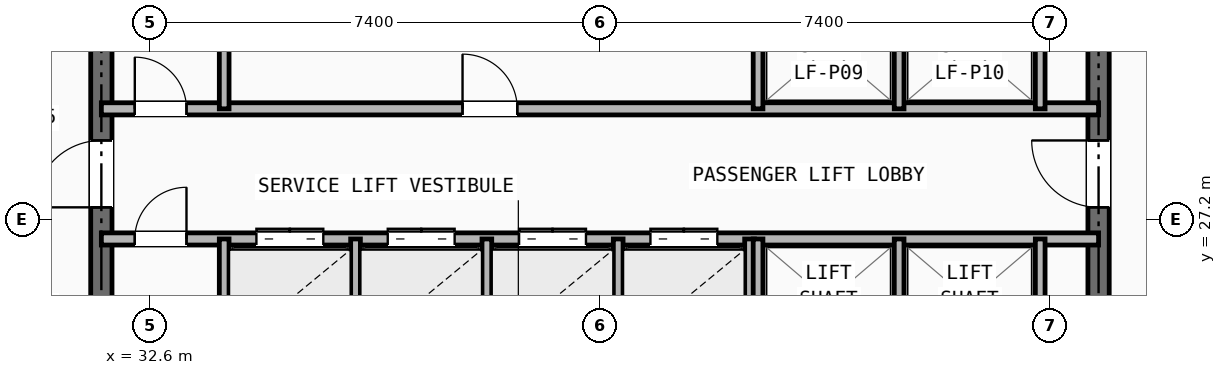
"""IFC4 building model, lengths in metres.
Left out: names, types, materials, properties, quantities, classifications, styles, units other than length and angle.
Written with IfcOpenShell. Run it as: python <this file> out.ifc"""

import sys

from ifc_helpers import new_model, si_unit, direction, frame, frame_2d, origin, place, context, subcontext, project, spatial, rectangle, extrude, element, fill, save


model = new_model("IFC4")
c1 = context("Model", 3, precision=1e-05, world=origin(), true_north=direction((0.0, 1.0)))
c2 = subcontext(c1, "Body", "Model", "MODEL_VIEW")
j1 = project(units=[si_unit("LENGTHUNIT", "METRE"), si_unit("PLANEANGLEUNIT", "RADIAN")], contexts=[c1])
p1 = place(None, origin())
s1 = spatial("IfcSite", under=j1, at=p1, CompositionType="ELEMENT")
p2 = place(p1, origin())
s2 = spatial("IfcBuilding", under=s1, at=p2, CompositionType="ELEMENT")
p3 = place(p2, frame((0.0, 0.0, 153.95)))
s3 = spatial("IfcBuildingStorey", under=s2, at=p3, CompositionType="ELEMENT", Elevation=153.95)
p4 = place(p3, frame((31.8, 16.4, 0.0), z_axis=(0.0, 0.0, 1.0), x_axis=(0.0, 1.0, 0.0)))
e1 = element("IfcWall", 1, at=p4, inside=s3, PredefinedType="SHEAR", context=c2, shape_type="SweptSolid", body=[
    extrude(rectangle(XDim=14.8, YDim=0.35, at=frame_2d((7.4, 0.0))), origin(), (0.0, 0.0, 1.0), 3.15),
])
p5 = place(p4, frame((11.0, 0.0, 0.0)))
e2 = element("IfcOpeningElement", 2, at=p5, cuts=e1, PredefinedType="OPENING", context=c2, shape_type="SweptSolid", body=[
    extrude(rectangle(XDim=1.1, YDim=2.15, at=frame_2d((0.55, 1.075))), frame((0.0, 0.185, 0.0), z_axis=(0.0, -1.0, 0.0), x_axis=(1.0, 0.0, 0.0)), (0.0, 0.0, 1.0), 0.37),
])
p6 = place(p3, frame((48.2, 16.4, 0.0), z_axis=(0.0, 0.0, 1.0), x_axis=(0.0, 1.0, 0.0)))
e3 = element("IfcWall", 3, at=p6, inside=s3, PredefinedType="SHEAR", context=c2, shape_type="SweptSolid", body=[
    extrude(rectangle(XDim=14.8, YDim=0.35, at=frame_2d((7.4, 0.0))), origin(), (0.0, 0.0, 1.0), 3.15),
])
p7 = place(p6, frame((11.0, 0.0, 0.0)))
e4 = element("IfcOpeningElement", 4, at=p7, cuts=e3, PredefinedType="OPENING", context=c2, shape_type="SweptSolid", body=[
    extrude(rectangle(XDim=1.1, YDim=2.15, at=frame_2d((0.55, 1.075))), frame((0.0, 0.185, 0.0), z_axis=(0.0, -1.0, 0.0), x_axis=(1.0, 0.0, 0.0)), (0.0, 0.0, 1.0), 0.37),
])
p8 = place(p3, frame((31.8, 29.02, 0.0), z_axis=(0.0, 0.0, 1.0), x_axis=(1.0, 0.0, 0.0)))
e5 = element("IfcWall", 5, at=p8, inside=s3, PredefinedType="SOLIDWALL", context=c2, shape_type="SweptSolid", body=[
    extrude(rectangle(XDim=16.4, YDim=0.2, at=frame_2d((8.2, 0.0))), origin(), (0.0, 0.0, 1.0), 2.601),
])
p9 = place(p8, frame((0.55, 0.0, 0.0)))
e6 = element("IfcOpeningElement", 6, at=p9, cuts=e5, PredefinedType="OPENING", context=c2, shape_type="SweptSolid", body=[
    extrude(rectangle(XDim=0.85, YDim=2.05, at=frame_2d((0.425, 1.025))), frame((0.0, 0.11, 0.0), z_axis=(0.0, -1.0, 0.0), x_axis=(1.0, 0.0, 0.0)), (0.0, 0.0, 1.0), 0.22),
])
p10 = place(p8, frame((5.94, 0.0, 0.0)))
e7 = element("IfcOpeningElement", 7, at=p10, cuts=e5, PredefinedType="OPENING", context=c2, shape_type="SweptSolid", body=[
    extrude(rectangle(XDim=0.9, YDim=2.1, at=frame_2d((0.45, 1.05))), frame((0.0, 0.11, 0.0), z_axis=(0.0, -1.0, 0.0), x_axis=(1.0, 0.0, 0.0)), (0.0, 0.0, 1.0), 0.22),
])
p11 = place(p3, frame((31.8, 26.88, 0.0), z_axis=(0.0, 0.0, 1.0), x_axis=(1.0, 0.0, 0.0)))
e8 = element("IfcWall", 8, at=p11, inside=s3, PredefinedType="SOLIDWALL", context=c2, shape_type="SweptSolid", body=[
    extrude(rectangle(XDim=16.4, YDim=0.2, at=frame_2d((8.2, 0.0))), origin(), (0.0, 0.0, 1.0), 2.601),
])
p12 = place(p11, frame((0.55, 0.0, 0.0)))
e9 = element("IfcOpeningElement", 9, at=p12, cuts=e8, PredefinedType="OPENING", context=c2, shape_type="SweptSolid", body=[
    extrude(rectangle(XDim=0.85, YDim=2.05, at=frame_2d((0.425, 1.025))), frame((0.0, 0.11, 0.0), z_axis=(0.0, -1.0, 0.0), x_axis=(1.0, 0.0, 0.0)), (0.0, 0.0, 1.0), 0.22),
])
p13 = place(p11, frame((2.55, 0.0, 0.0)))
e10 = element("IfcOpeningElement", 10, at=p13, cuts=e8, PredefinedType="OPENING", context=c2, shape_type="SweptSolid", body=[
    extrude(rectangle(XDim=1.1, YDim=2.15, at=frame_2d((0.55, 1.075))), frame((0.0, 0.11, 0.0), z_axis=(0.0, -1.0, 0.0), x_axis=(1.0, 0.0, 0.0)), (0.0, 0.0, 1.0), 0.22),
])
p14 = place(p11, frame((4.71, 0.0, 0.0)))
e11 = element("IfcOpeningElement", 11, at=p14, cuts=e8, PredefinedType="OPENING", context=c2, shape_type="SweptSolid", body=[
    extrude(rectangle(XDim=1.1, YDim=2.15, at=frame_2d((0.55, 1.075))), frame((0.0, 0.11, 0.0), z_axis=(0.0, -1.0, 0.0), x_axis=(1.0, 0.0, 0.0)), (0.0, 0.0, 1.0), 0.22),
])
p15 = place(p11, frame((6.87, 0.0, 0.0)))
e12 = element("IfcOpeningElement", 12, at=p15, cuts=e8, PredefinedType="OPENING", context=c2, shape_type="SweptSolid", body=[
    extrude(rectangle(XDim=1.1, YDim=2.15, at=frame_2d((0.55, 1.075))), frame((0.0, 0.11, 0.0), z_axis=(0.0, -1.0, 0.0), x_axis=(1.0, 0.0, 0.0)), (0.0, 0.0, 1.0), 0.22),
])
p16 = place(p11, frame((9.03, 0.0, 0.0)))
e13 = element("IfcOpeningElement", 13, at=p16, cuts=e8, PredefinedType="OPENING", context=c2, shape_type="SweptSolid", body=[
    extrude(rectangle(XDim=1.1, YDim=2.15, at=frame_2d((0.55, 1.075))), frame((0.0, 0.11, 0.0), z_axis=(0.0, -1.0, 0.0), x_axis=(1.0, 0.0, 0.0)), (0.0, 0.0, 1.0), 0.22),
])
p17 = place(p3, frame((33.82, 29.02, 0.0), z_axis=(0.0, 0.0, 1.0), x_axis=(0.0, 1.0, 0.0)))
e14 = element("IfcWall", 14, at=p17, inside=s3, PredefinedType="SOLIDWALL", context=c2, shape_type="SweptSolid", body=[
    extrude(rectangle(XDim=2.18, YDim=0.16, at=frame_2d((1.09, 0.0))), origin(), (0.0, 0.0, 1.0), 2.601),
])
for number, where, z_axis, x_axis in (
    (15, (33.82, 24.8, 0.0), (0.0, 0.0, 1.0), (0.0, 1.0, 0.0)),
    (16, (35.98, 24.8, 0.0), (0.0, 0.0, 1.0), (0.0, 1.0, 0.0)),
    (17, (38.14, 24.8, 0.0), (0.0, 0.0, 1.0), (0.0, 1.0, 0.0)),
    (18, (40.3, 24.8, 0.0), (0.0, 0.0, 1.0), (0.0, 1.0, 0.0)),
    (19, (42.46, 24.8, 0.0), (0.0, 0.0, 1.0), (0.0, 1.0, 0.0)),
):
    element("IfcWall", number, at=place(p3, frame(where, z_axis=z_axis, x_axis=x_axis)), inside=s3, PredefinedType="SOLIDWALL", context=c2, shape_type="SweptSolid", body=[
        extrude(rectangle(XDim=2.08, YDim=0.16, at=frame_2d((1.04, 0.0))), origin(), (0.0, 0.0, 1.0), 3.15),
    ])
for number, where, z_axis, x_axis in (
    (20, (42.6, 29.02, 0.0), (0.0, 0.0, 1.0), (0.0, 1.0, 0.0)),
    (21, (44.92, 29.02, 0.0), (0.0, 0.0, 1.0), (0.0, 1.0, 0.0)),
    (22, (47.24, 29.02, 0.0), (0.0, 0.0, 1.0), (0.0, 1.0, 0.0)),
):
    element("IfcWall", number, at=place(p3, frame(where, z_axis=z_axis, x_axis=x_axis)), inside=s3, PredefinedType="SOLIDWALL", context=c2, shape_type="SweptSolid", body=[
        extrude(rectangle(XDim=2.18, YDim=0.16, at=frame_2d((1.09, 0.0))), origin(), (0.0, 0.0, 1.0), 2.601),
    ])
for number, where, z_axis, x_axis in (
    (23, (42.6, 24.8, 0.0), (0.0, 0.0, 1.0), (0.0, 1.0, 0.0)),
    (24, (44.92, 24.8, 0.0), (0.0, 0.0, 1.0), (0.0, 1.0, 0.0)),
    (25, (47.24, 24.8, 0.0), (0.0, 0.0, 1.0), (0.0, 1.0, 0.0)),
):
    element("IfcWall", number, at=place(p3, frame(where, z_axis=z_axis, x_axis=x_axis)), inside=s3, PredefinedType="SOLIDWALL", context=c2, shape_type="SweptSolid", body=[
        extrude(rectangle(XDim=2.08, YDim=0.16, at=frame_2d((1.04, 0.0))), origin(), (0.0, 0.0, 1.0), 3.15),
    ])
p18 = place(p9, origin())
e26 = element("IfcDoor", 26, at=p18, inside=s3, OperationType="SINGLE_SWING_LEFT", PredefinedType="DOOR", context=c2, shape_type="SweptSolid", body=[
    extrude(rectangle(XDim=0.85, YDim=2.05, at=frame_2d((0.425, 1.025))), frame((0.0, 0.025, 0.0), z_axis=(0.0, -1.0, 0.0), x_axis=(1.0, 0.0, 0.0)), (0.0, 0.0, 1.0), 0.05),
])
fill(e6, e26)
p19 = place(p12, origin())
e27 = element("IfcDoor", 27, at=p19, inside=s3, OperationType="SINGLE_SWING_RIGHT", PredefinedType="DOOR", context=c2, shape_type="SweptSolid", body=[
    extrude(rectangle(XDim=0.85, YDim=2.05, at=frame_2d((0.425, 1.025))), frame((0.0, 0.025, 0.0), z_axis=(0.0, -1.0, 0.0), x_axis=(1.0, 0.0, 0.0)), (0.0, 0.0, 1.0), 0.05),
])
fill(e9, e27)
p20 = place(p5, origin())
e28 = element("IfcDoor", 28, at=p20, inside=s3, OperationType="SINGLE_SWING_LEFT", PredefinedType="DOOR", context=c2, shape_type="SweptSolid", body=[
    extrude(rectangle(XDim=1.1, YDim=2.15, at=frame_2d((0.55, 1.075))), frame((0.0, 0.025, 0.0), z_axis=(0.0, -1.0, 0.0), x_axis=(1.0, 0.0, 0.0)), (0.0, 0.0, 1.0), 0.05),
])
fill(e2, e28)
p21 = place(p7, origin())
e29 = element("IfcDoor", 29, at=p21, inside=s3, OperationType="SINGLE_SWING_RIGHT", PredefinedType="DOOR", context=c2, shape_type="SweptSolid", body=[
    extrude(rectangle(XDim=1.1, YDim=2.15, at=frame_2d((0.55, 1.075))), frame((0.0, 0.025, 0.0), z_axis=(0.0, -1.0, 0.0), x_axis=(1.0, 0.0, 0.0)), (0.0, 0.0, 1.0), 0.05),
])
fill(e4, e29)
p22 = place(p10, origin())
e30 = element("IfcDoor", 30, at=p22, inside=s3, OperationType="SINGLE_SWING_LEFT", PredefinedType="DOOR", context=c2, shape_type="SweptSolid", body=[
    extrude(rectangle(XDim=0.9, YDim=2.1, at=frame_2d((0.45, 1.05))), frame((0.0, 0.025, 0.0), z_axis=(0.0, -1.0, 0.0), x_axis=(1.0, 0.0, 0.0)), (0.0, 0.0, 1.0), 0.05),
])
fill(e7, e30)
p23 = place(p13, origin())
e31 = element("IfcDoor", 31, at=p23, inside=s3, OperationType="DOUBLE_DOOR_SLIDING", PredefinedType="DOOR", context=c2, shape_type="SweptSolid", body=[
    extrude(rectangle(XDim=1.1, YDim=2.15, at=frame_2d((0.55, 1.075))), frame((0.0, 0.025, 0.0), z_axis=(0.0, -1.0, 0.0), x_axis=(1.0, 0.0, 0.0)), (0.0, 0.0, 1.0), 0.05),
])
fill(e10, e31)
p24 = place(p14, origin())
e32 = element("IfcDoor", 32, at=p24, inside=s3, OperationType="DOUBLE_DOOR_SLIDING", PredefinedType="DOOR", context=c2, shape_type="SweptSolid", body=[
    extrude(rectangle(XDim=1.1, YDim=2.15, at=frame_2d((0.55, 1.075))), frame((0.0, 0.025, 0.0), z_axis=(0.0, -1.0, 0.0), x_axis=(1.0, 0.0, 0.0)), (0.0, 0.0, 1.0), 0.05),
])
fill(e11, e32)
p25 = place(p15, origin())
e33 = element("IfcDoor", 33, at=p25, inside=s3, OperationType="DOUBLE_DOOR_SLIDING", PredefinedType="DOOR", context=c2, shape_type="SweptSolid", body=[
    extrude(rectangle(XDim=1.1, YDim=2.15, at=frame_2d((0.55, 1.075))), frame((0.0, 0.025, 0.0), z_axis=(0.0, -1.0, 0.0), x_axis=(1.0, 0.0, 0.0)), (0.0, 0.0, 1.0), 0.05),
])
fill(e12, e33)
p26 = place(p16, origin())
e34 = element("IfcDoor", 34, at=p26, inside=s3, OperationType="DOUBLE_DOOR_SLIDING", PredefinedType="DOOR", context=c2, shape_type="SweptSolid", body=[
    extrude(rectangle(XDim=1.1, YDim=2.15, at=frame_2d((0.55, 1.075))), frame((0.0, 0.025, 0.0), z_axis=(0.0, -1.0, 0.0), x_axis=(1.0, 0.0, 0.0)), (0.0, 0.0, 1.0), 0.05),
])
fill(e13, e34)
save(model, sys.argv[1])
